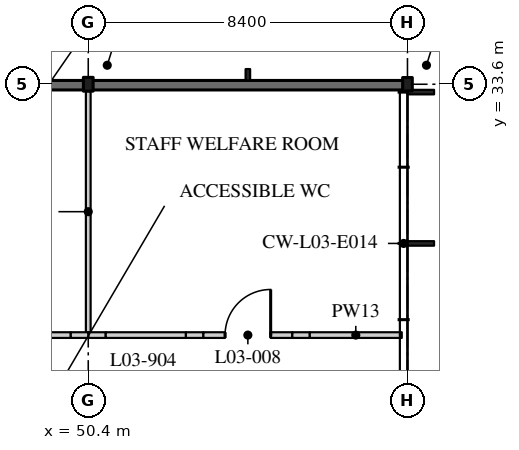
"""IFC4 building model, lengths in metres.
Left out: names, types, materials, properties, quantities, classifications, styles, units other than length and angle.
Written with IfcOpenShell. Run it as: python <this file> out.ifc"""

import sys

from ifc_helpers import new_model, si_unit, direction, frame, frame_2d, origin, origin_2d, place, context, subcontext, project, spatial, rectangle, i_section, extrude, element, fill, save


model = new_model("IFC4")
c1 = context("Model", 3, precision=1e-05, world=origin(), true_north=direction((0.0, 1.0)))
c2 = subcontext(c1, "Body", "Model", "MODEL_VIEW")
j1 = project(units=[si_unit("LENGTHUNIT", "METRE"), si_unit("PLANEANGLEUNIT", "RADIAN")], contexts=[c1])
p1 = place(None, origin())
s1 = spatial("IfcSite", under=j1, at=p1, CompositionType="ELEMENT")
p2 = place(p1, origin())
s2 = spatial("IfcBuilding", under=s1, at=p2, CompositionType="ELEMENT")
p3 = place(p2, frame((0.0, 0.0, 14.4)))
s3 = spatial("IfcBuildingStorey", under=s2, at=p3, CompositionType="ELEMENT", Elevation=14.4)
p4 = place(p3, frame((50.4, 33.6, 0.0), z_axis=(0.0, 0.0, 1.0), x_axis=(1.0, 0.0, 0.0)))
e1 = element("IfcColumn", 1, at=p4, inside=s3, PredefinedType="COLUMN", context=c2, shape_type="SweptSolid", body=[
    extrude(i_section(OverallWidth=0.257, OverallDepth=0.363, WebThickness=0.013, FlangeThickness=0.022, FilletRadius=0.015, at=origin_2d()), origin(), (0.0, 0.0, 1.0), 4.37),
])
p5 = place(p3, frame((58.8, 33.6, 0.0), z_axis=(0.0, 0.0, 1.0), x_axis=(1.0, 0.0, 0.0)))
e2 = element("IfcColumn", 2, at=p5, inside=s3, PredefinedType="COLUMN", context=c2, shape_type="SweptSolid", body=[
    extrude(i_section(OverallWidth=0.254, OverallDepth=0.353, WebThickness=0.01, FlangeThickness=0.016, FilletRadius=0.015, at=origin_2d()), origin(), (0.0, 0.0, 1.0), 4.37),
])
p6 = place(p3, frame((50.4, 27.075, 0.0), z_axis=(0.0, 0.0, 1.0), x_axis=(0.0, 1.0, 0.0)))
e3 = element("IfcWall", 3, at=p6, inside=s3, PredefinedType="PARTITIONING", context=c2, shape_type="SweptSolid", body=[
    extrude(rectangle(XDim=6.344, YDim=0.125, at=frame_2d((3.172, 0.0))), origin(), (0.0, 0.0, 1.0), 3.743),
])
p7 = place(p3, frame((50.4, 27.0, 0.0), z_axis=(0.0, 0.0, 1.0), x_axis=(1.0, 0.0, 0.0)))
e4 = element("IfcWall", 4, at=p7, inside=s3, PredefinedType="PARTITIONING", context=c2, shape_type="SweptSolid", body=[
    extrude(rectangle(XDim=0.46, YDim=0.15, at=frame_2d((0.23, 0.0))), origin(), (0.0, 0.0, 1.0), 3.743),
])
p8 = place(p3, frame((50.86, 27.0, 0.0), z_axis=(0.0, 0.0, 1.0), x_axis=(1.0, 0.0, 0.0)))
e5 = element("IfcWall", 5, at=p8, inside=s3, PredefinedType="PARTITIONING", context=c2, shape_type="SweptSolid", body=[
    extrude(rectangle(XDim=2.11, YDim=0.15, at=frame_2d((1.055, 0.0))), origin(), (0.0, 0.0, 1.0), 4.37),
])
p9 = place(p3, frame((52.97, 27.0, 0.0), z_axis=(0.0, 0.0, 1.0), x_axis=(1.0, 0.0, 0.0)))
e6 = element("IfcWall", 6, at=p9, inside=s3, PredefinedType="PARTITIONING", context=c2, shape_type="SweptSolid", body=[
    extrude(rectangle(XDim=0.46, YDim=0.15, at=frame_2d((0.23, 0.0))), origin(), (0.0, 0.0, 1.0), 3.941),
])
p10 = place(p3, frame((53.43, 27.0, 0.0), z_axis=(0.0, 0.0, 1.0), x_axis=(1.0, 0.0, 0.0)))
e7 = element("IfcWall", 7, at=p10, inside=s3, PredefinedType="PARTITIONING", context=c2, shape_type="SweptSolid", body=[
    extrude(rectangle(XDim=2.34, YDim=0.15, at=frame_2d((1.17, 0.0))), origin(), (0.0, 0.0, 1.0), 4.37),
])
p11 = place(p10, frame((0.57, 0.0, 0.0)))
e8 = element("IfcOpeningElement", 8, at=p11, cuts=e7, PredefinedType="OPENING", context=c2, shape_type="SweptSolid", body=[
    extrude(rectangle(XDim=1.2, YDim=2.4, at=frame_2d((0.6, 1.2))), frame((0.0, 0.085, 0.0), z_axis=(0.0, -1.0, 0.0), x_axis=(1.0, 0.0, 0.0)), (0.0, 0.0, 1.0), 0.17),
])
p12 = place(p3, frame((55.77, 27.0, 0.0), z_axis=(0.0, 0.0, 1.0), x_axis=(1.0, 0.0, 0.0)))
e9 = element("IfcWall", 9, at=p12, inside=s3, PredefinedType="PARTITIONING", context=c2, shape_type="SweptSolid", body=[
    extrude(rectangle(XDim=0.46, YDim=0.15, at=frame_2d((0.23, 0.0))), origin(), (0.0, 0.0, 1.0), 3.941),
])
p13 = place(p3, frame((56.23, 27.0, 0.0), z_axis=(0.0, 0.0, 1.0), x_axis=(1.0, 0.0, 0.0)))
e10 = element("IfcWall", 10, at=p13, inside=s3, PredefinedType="PARTITIONING", context=c2, shape_type="SweptSolid", body=[
    extrude(rectangle(XDim=2.42, YDim=0.15, at=frame_2d((1.21, 0.0))), origin(), (0.0, 0.0, 1.0), 4.37),
])
p14 = place(p3, frame((47.83, 27.0, 0.0), z_axis=(0.0, 0.0, 1.0), x_axis=(1.0, 0.0, 0.0)))
e11 = element("IfcWall", 11, at=p14, inside=s3, PredefinedType="PARTITIONING", context=c2, shape_type="SweptSolid", body=[
    extrude(rectangle(XDim=2.11, YDim=0.15, at=frame_2d((1.055, 0.0))), origin(), (0.0, 0.0, 1.0), 4.37),
])
p15 = place(p3, frame((49.94, 27.0, 0.0), z_axis=(0.0, 0.0, 1.0), x_axis=(1.0, 0.0, 0.0)))
e12 = element("IfcWall", 12, at=p15, inside=s3, PredefinedType="PARTITIONING", context=c2, shape_type="SweptSolid", body=[
    extrude(rectangle(XDim=0.46, YDim=0.15, at=frame_2d((0.23, 0.0))), origin(), (0.0, 0.0, 1.0), 3.743),
])
p16 = place(p3, frame((58.795, 33.575, 0.0), z_axis=(0.0, 0.0, 1.0), x_axis=(-1.0, 0.0, 0.0)))
e13 = element("IfcWall", 13, at=p16, inside=s3, PredefinedType="SOLIDWALL", context=c2, shape_type="SweptSolid", body=[
    extrude(rectangle(XDim=8.391, YDim=0.25, at=frame_2d((4.195, 0.0))), origin(), (0.0, 0.0, 1.0), 3.819),
])
p17 = place(p3, frame((50.396, 33.575, 0.0), z_axis=(0.0, 0.0, 1.0), x_axis=(-1.0, 0.0, 0.0)))
e14 = element("IfcWall", 14, at=p17, inside=s3, PredefinedType="SOLIDWALL", context=c2, shape_type="SweptSolid", body=[
    extrude(rectangle(XDim=8.393, YDim=0.25, at=frame_2d((4.196, 0.0))), origin(), (0.0, 0.0, 1.0), 3.743),
])
p18 = place(p11, origin())
e15 = element("IfcDoor", 15, at=p18, inside=s3, OperationType="SINGLE_SWING_LEFT", PredefinedType="DOOR", context=c2, shape_type="SweptSolid", body=[
    extrude(rectangle(XDim=1.2, YDim=2.4, at=frame_2d((0.6, 1.2))), frame((0.0, 0.025, 0.0), z_axis=(0.0, -1.0, 0.0), x_axis=(1.0, 0.0, 0.0)), (0.0, 0.0, 1.0), 0.05),
])
fill(e8, e15)
save(model, sys.argv[1])
